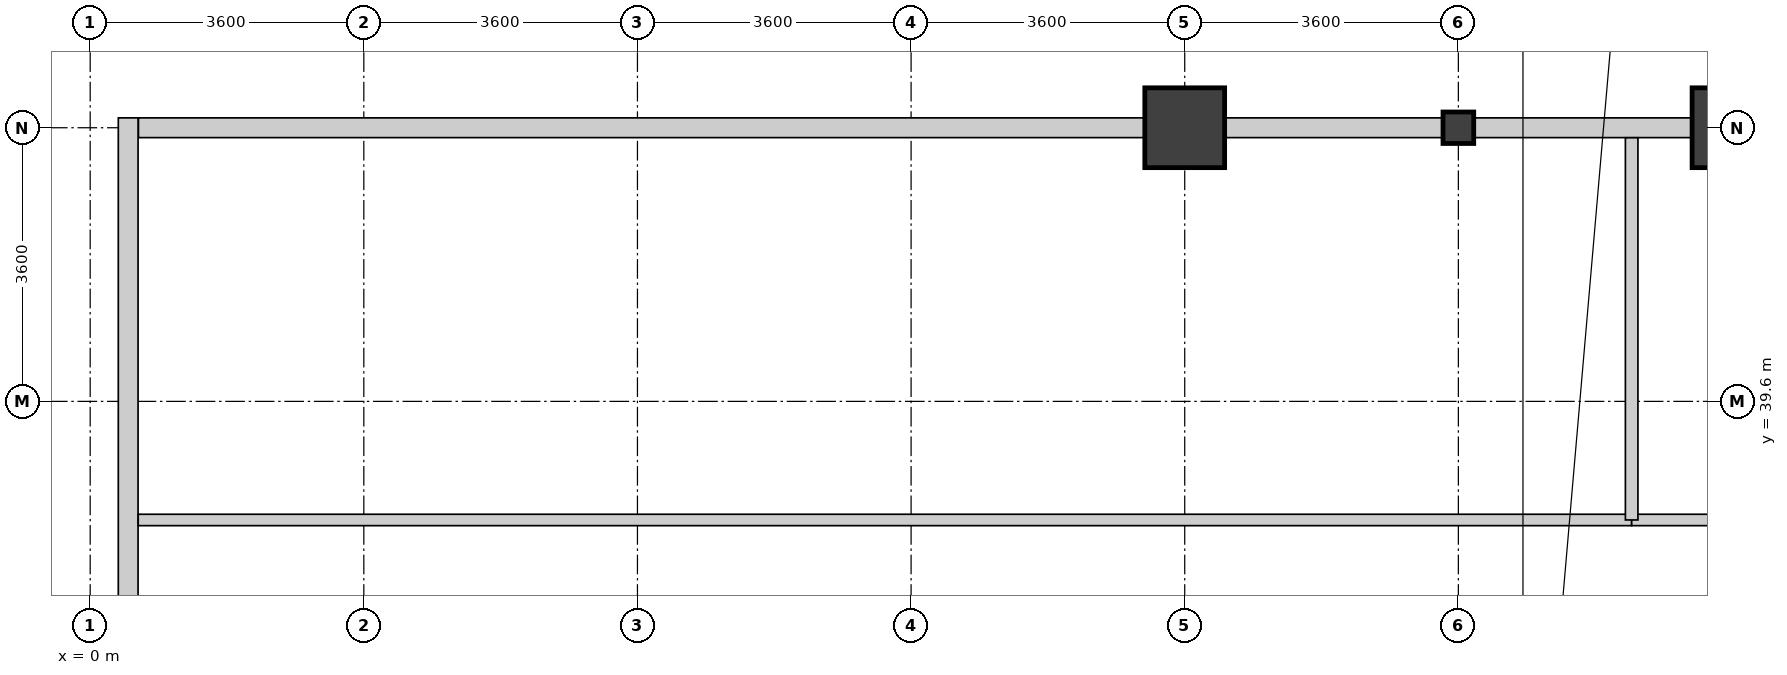
"""IFC4 building model, lengths in metres.
Left out: names, types, materials, properties, quantities, classifications, styles, units other than length and angle.
Written with IfcOpenShell. Run it as: python <this file> out.ifc"""

import sys

from ifc_helpers import new_model, si_unit, direction, frame, frame_2d, origin, origin_2d, place, context, subcontext, project, spatial, rectangle, i_section, extrude, source, transform, mapped, element, fill, save


model = new_model("IFC4")
c1 = context("Model", 3, precision=1e-05, world=origin(), true_north=direction((0.0, 1.0)))
c2 = subcontext(c1, "Body", "Model", "MODEL_VIEW")
j1 = project(units=[si_unit("LENGTHUNIT", "METRE"), si_unit("PLANEANGLEUNIT", "RADIAN")], contexts=[c1])
p1 = place(None, origin())
s1 = spatial("IfcSite", under=j1, at=p1, CompositionType="ELEMENT")
p2 = place(p1, origin())
s2 = spatial("IfcBuilding", under=s1, at=p2, CompositionType="ELEMENT")
p3 = place(p2, frame((0.0, 0.0, 135.6)))
s3 = spatial("IfcBuildingStorey", under=s2, at=p3, CompositionType="ELEMENT", Elevation=135.6)
m1 = source(origin(), c2, "Body", "SweptSolid", [
    extrude(rectangle(XDim=1.05, YDim=1.05, at=origin_2d()), origin(), (0.0, 0.0, 1.0), 4.6),
])
for number, where, z_axis, x_axis in (
    (1, (14.4, 43.2, 0.0), (0.0, 0.0, 1.0), (1.0, 0.0, 0.0)),
    (2, (21.6, 43.2, 0.0), (0.0, 0.0, 1.0), (1.0, 0.0, 0.0)),
):
    element("IfcColumn", number, at=place(p3, frame(where, z_axis=z_axis, x_axis=x_axis)), inside=s3, PredefinedType="COLUMN", context=c2, shape_type="MappedRepresentation", body=[
        mapped(m1, transform((0.0, 0.0, 0.0), x_axis=(1.0, 0.0, 0.0), y_axis=(0.0, 1.0, 0.0), z_axis=(0.0, 0.0, 1.0), scale=1.0)),
    ])
m2 = source(origin(), c2, "Body", "SweptSolid", [
    extrude(i_section(OverallWidth=0.404, OverallDepth=0.414, WebThickness=0.021, FlangeThickness=0.028, FilletRadius=0.015, at=origin_2d()), origin(), (0.0, 0.0, 1.0), 4.6),
])
p4 = place(p3, frame((18.0, 43.2, 0.0), z_axis=(0.0, 0.0, 1.0), x_axis=(1.0, 0.0, 0.0)))
e3 = element("IfcColumn", 3, at=p4, inside=s3, PredefinedType="COLUMN", context=c2, shape_type="MappedRepresentation", body=[
    mapped(m2, transform((0.0, 0.0, 0.0), x_axis=(1.0, 0.0, 0.0), y_axis=(0.0, 1.0, 0.0), z_axis=(0.0, 0.0, 1.0), scale=1.0)),
])
p5 = place(p3, frame((18.203, 43.2, 0.0), z_axis=(0.0, 0.0, 1.0), x_axis=(1.0, 0.0, 0.0)))
e4 = element("IfcWall", 4, at=p5, inside=s3, PredefinedType="STANDARD", context=c2, shape_type="SweptSolid", body=[
    extrude(rectangle(XDim=2.871, YDim=0.26, at=frame_2d((1.436, 0.0))), origin(), (0.0, 0.0, 1.0), 3.89),
])
p6 = place(p5, frame((0.249, 0.0, 0.85)))
e5 = element("IfcOpeningElement", 5, at=p6, cuts=e4, PredefinedType="OPENING", context=c2, shape_type="SweptSolid", body=[
    extrude(rectangle(XDim=0.95, YDim=1.75, at=frame_2d((0.475, 0.875))), frame((0.0, 0.14, 0.0), z_axis=(0.0, -1.0, 0.0), x_axis=(1.0, 0.0, 0.0)), (0.0, 0.0, 1.0), 0.28),
])
p7 = place(p3, frame((14.926, 43.2, 0.0), z_axis=(0.0, 0.0, 1.0), x_axis=(1.0, 0.0, 0.0)))
e6 = element("IfcWall", 6, at=p7, inside=s3, PredefinedType="STANDARD", context=c2, shape_type="SweptSolid", body=[
    extrude(rectangle(XDim=2.871, YDim=0.26, at=frame_2d((1.436, 0.0))), origin(), (0.0, 0.0, 1.0), 3.89),
])
p8 = place(p7, frame((0.96, 0.0, 0.85)))
e7 = element("IfcOpeningElement", 7, at=p8, cuts=e6, PredefinedType="OPENING", context=c2, shape_type="SweptSolid", body=[
    extrude(rectangle(XDim=0.95, YDim=1.75, at=frame_2d((0.475, 0.875))), frame((0.0, 0.14, 0.0), z_axis=(0.0, -1.0, 0.0), x_axis=(1.0, 0.0, 0.0)), (0.0, 0.0, 1.0), 0.28),
])
p9 = place(p3, frame((0.635, 43.2, 0.0), z_axis=(0.0, 0.0, 1.0), x_axis=(1.0, 0.0, 0.0)))
e8 = element("IfcWall", 8, at=p9, inside=s3, PredefinedType="STANDARD", context=c2, shape_type="SweptSolid", body=[
    extrude(rectangle(XDim=13.239, YDim=0.26, at=frame_2d((6.62, 0.0))), origin(), (0.0, 0.0, 1.0), 4.34),
])
p10 = place(p9, frame((0.305, 0.0, 0.85)))
e9 = element("IfcOpeningElement", 9, at=p10, cuts=e8, PredefinedType="OPENING", context=c2, shape_type="SweptSolid", body=[
    extrude(rectangle(XDim=2.7, YDim=2.05, at=frame_2d((1.35, 1.025))), frame((0.0, 0.14, 0.0), z_axis=(0.0, -1.0, 0.0), x_axis=(1.0, 0.0, 0.0)), (0.0, 0.0, 1.0), 0.28),
])
p11 = place(p9, frame((3.615, 0.0, 0.85)))
e10 = element("IfcOpeningElement", 10, at=p11, cuts=e8, PredefinedType="OPENING", context=c2, shape_type="SweptSolid", body=[
    extrude(rectangle(XDim=2.7, YDim=2.05, at=frame_2d((1.35, 1.025))), frame((0.0, 0.14, 0.0), z_axis=(0.0, -1.0, 0.0), x_axis=(1.0, 0.0, 0.0)), (0.0, 0.0, 1.0), 0.28),
])
p12 = place(p9, frame((6.924, 0.0, 0.85)))
e11 = element("IfcOpeningElement", 11, at=p12, cuts=e8, PredefinedType="OPENING", context=c2, shape_type="SweptSolid", body=[
    extrude(rectangle(XDim=2.7, YDim=2.05, at=frame_2d((1.35, 1.025))), frame((0.0, 0.14, 0.0), z_axis=(0.0, -1.0, 0.0), x_axis=(1.0, 0.0, 0.0)), (0.0, 0.0, 1.0), 0.28),
])
p13 = place(p9, frame((10.234, 0.0, 0.85)))
e12 = element("IfcOpeningElement", 12, at=p13, cuts=e8, PredefinedType="OPENING", context=c2, shape_type="SweptSolid", body=[
    extrude(rectangle(XDim=2.7, YDim=2.05, at=frame_2d((1.35, 1.025))), frame((0.0, 0.14, 0.0), z_axis=(0.0, -1.0, 0.0), x_axis=(1.0, 0.0, 0.0)), (0.0, 0.0, 1.0), 0.28),
])
p14 = place(p3, frame((0.5, 36.358, 0.0), z_axis=(0.0, 0.0, 1.0), x_axis=(0.0, 1.0, 0.0)))
e13 = element("IfcWall", 13, at=p14, inside=s3, PredefinedType="STANDARD", context=c2, shape_type="SweptSolid", body=[
    extrude(rectangle(XDim=6.972, YDim=0.26, at=frame_2d((3.486, 0.0))), origin(), (0.0, 0.0, 1.0), 4.34),
])
p15 = place(p14, frame((3.879, 0.0, 0.85)))
e14 = element("IfcOpeningElement", 14, at=p15, cuts=e13, PredefinedType="OPENING", context=c2, shape_type="SweptSolid", body=[
    extrude(rectangle(XDim=2.7, YDim=2.05, at=frame_2d((1.35, 1.025))), frame((0.0, 0.14, 0.0), z_axis=(0.0, -1.0, 0.0), x_axis=(1.0, 0.0, 0.0)), (0.0, 0.0, 1.0), 0.28),
])
p16 = place(p14, frame((2.453, 0.0, 0.85)))
e15 = element("IfcOpeningElement", 15, at=p16, cuts=e13, PredefinedType="OPENING", context=c2, shape_type="SweptSolid", body=[
    extrude(rectangle(XDim=0.95, YDim=1.75, at=frame_2d((0.475, 0.875))), frame((0.0, 0.14, 0.0), z_axis=(0.0, -1.0, 0.0), x_axis=(1.0, 0.0, 0.0)), (0.0, 0.0, 1.0), 0.28),
])
p17 = place(p3, frame((0.632, 38.04, 0.0), z_axis=(0.0, 0.0, 1.0), x_axis=(1.0, 0.0, 0.0)))
e16 = element("IfcWall", 16, at=p17, inside=s3, PredefinedType="PARTITIONING", context=c2, shape_type="SweptSolid", body=[
    extrude(rectangle(XDim=19.648, YDim=0.15, at=frame_2d((9.824, 0.0))), origin(), (0.0, 0.0, 1.0), 4.34),
])
p18 = place(p17, frame((9.174, 0.0, 0.0)))
e17 = element("IfcOpeningElement", 17, at=p18, cuts=e16, PredefinedType="OPENING", context=c2, shape_type="SweptSolid", body=[
    extrude(rectangle(XDim=1.3, YDim=2.12, at=frame_2d((0.65, 1.06))), frame((0.0, 0.085, 0.0), z_axis=(0.0, -1.0, 0.0), x_axis=(1.0, 0.0, 0.0)), (0.0, 0.0, 1.0), 0.17),
])
p19 = place(p3, frame((20.28, 38.04, 0.0), z_axis=(0.0, 0.0, 1.0), x_axis=(1.0, 0.0, 0.0)))
e18 = element("IfcWall", 18, at=p19, inside=s3, PredefinedType="PARTITIONING", context=c2, shape_type="SweptSolid", body=[
    extrude(rectangle(XDim=18.02, YDim=0.15, at=frame_2d((9.01, 0.0))), origin(), (0.0, 0.0, 1.0), 4.34),
])
p20 = place(p19, frame((8.56, 0.0, 0.0)))
e19 = element("IfcOpeningElement", 19, at=p20, cuts=e18, PredefinedType="OPENING", context=c2, shape_type="SweptSolid", body=[
    extrude(rectangle(XDim=0.9, YDim=2.08, at=frame_2d((0.45, 1.04))), frame((0.0, 0.085, 0.0), z_axis=(0.0, -1.0, 0.0), x_axis=(1.0, 0.0, 0.0)), (0.0, 0.0, 1.0), 0.17),
])
p21 = place(p3, frame((20.28, 38.04, 0.0), z_axis=(0.0, 0.0, 1.0), x_axis=(0.0, 1.0, 0.0)))
e20 = element("IfcWall", 20, at=p21, inside=s3, PredefinedType="PARTITIONING", context=c2, shape_type="SweptSolid", body=[
    extrude(rectangle(XDim=5.028, YDim=0.165, at=frame_2d((2.514, 0.0))), origin(), (0.0, 0.0, 1.0), 4.34),
])
p22 = place(p6, origin())
e21 = element("IfcWindow", 21, at=p22, inside=s3, PartitioningType="SINGLE_PANEL", PredefinedType="WINDOW", context=c2, shape_type="SweptSolid", body=[
    extrude(rectangle(XDim=0.95, YDim=1.75, at=frame_2d((0.475, 0.875))), frame((0.0, 0.03, 0.0), z_axis=(0.0, -1.0, 0.0), x_axis=(1.0, 0.0, 0.0)), (0.0, 0.0, 1.0), 0.06),
])
fill(e5, e21)
p23 = place(p8, origin())
e22 = element("IfcWindow", 22, at=p23, inside=s3, PartitioningType="SINGLE_PANEL", PredefinedType="WINDOW", context=c2, shape_type="SweptSolid", body=[
    extrude(rectangle(XDim=0.95, YDim=1.75, at=frame_2d((0.475, 0.875))), frame((0.0, 0.03, 0.0), z_axis=(0.0, -1.0, 0.0), x_axis=(1.0, 0.0, 0.0)), (0.0, 0.0, 1.0), 0.06),
])
fill(e7, e22)
p24 = place(p10, origin())
e23 = element("IfcWindow", 23, at=p24, inside=s3, PartitioningType="SINGLE_PANEL", PredefinedType="WINDOW", context=c2, shape_type="SweptSolid", body=[
    extrude(rectangle(XDim=2.7, YDim=2.05, at=frame_2d((1.35, 1.025))), frame((0.0, 0.03, 0.0), z_axis=(0.0, -1.0, 0.0), x_axis=(1.0, 0.0, 0.0)), (0.0, 0.0, 1.0), 0.06),
])
fill(e9, e23)
p25 = place(p11, origin())
e24 = element("IfcWindow", 24, at=p25, inside=s3, PartitioningType="SINGLE_PANEL", PredefinedType="WINDOW", context=c2, shape_type="SweptSolid", body=[
    extrude(rectangle(XDim=2.7, YDim=2.05, at=frame_2d((1.35, 1.025))), frame((0.0, 0.03, 0.0), z_axis=(0.0, -1.0, 0.0), x_axis=(1.0, 0.0, 0.0)), (0.0, 0.0, 1.0), 0.06),
])
fill(e10, e24)
p26 = place(p12, origin())
e25 = element("IfcWindow", 25, at=p26, inside=s3, PartitioningType="SINGLE_PANEL", PredefinedType="WINDOW", context=c2, shape_type="SweptSolid", body=[
    extrude(rectangle(XDim=2.7, YDim=2.05, at=frame_2d((1.35, 1.025))), frame((0.0, 0.03, 0.0), z_axis=(0.0, -1.0, 0.0), x_axis=(1.0, 0.0, 0.0)), (0.0, 0.0, 1.0), 0.06),
])
fill(e11, e25)
p27 = place(p13, origin())
e26 = element("IfcWindow", 26, at=p27, inside=s3, PartitioningType="SINGLE_PANEL", PredefinedType="WINDOW", context=c2, shape_type="SweptSolid", body=[
    extrude(rectangle(XDim=2.7, YDim=2.05, at=frame_2d((1.35, 1.025))), frame((0.0, 0.03, 0.0), z_axis=(0.0, -1.0, 0.0), x_axis=(1.0, 0.0, 0.0)), (0.0, 0.0, 1.0), 0.06),
])
fill(e12, e26)
p28 = place(p15, origin())
e27 = element("IfcWindow", 27, at=p28, inside=s3, PartitioningType="SINGLE_PANEL", PredefinedType="WINDOW", context=c2, shape_type="SweptSolid", body=[
    extrude(rectangle(XDim=2.7, YDim=2.05, at=frame_2d((1.35, 1.025))), frame((0.0, 0.03, 0.0), z_axis=(0.0, -1.0, 0.0), x_axis=(1.0, 0.0, 0.0)), (0.0, 0.0, 1.0), 0.06),
])
fill(e14, e27)
p29 = place(p16, origin())
e28 = element("IfcWindow", 28, at=p29, inside=s3, PartitioningType="SINGLE_PANEL", PredefinedType="WINDOW", context=c2, shape_type="SweptSolid", body=[
    extrude(rectangle(XDim=0.95, YDim=1.75, at=frame_2d((0.475, 0.875))), frame((0.0, 0.03, 0.0), z_axis=(0.0, -1.0, 0.0), x_axis=(1.0, 0.0, 0.0)), (0.0, 0.0, 1.0), 0.06),
])
fill(e15, e28)
p30 = place(p18, origin())
e29 = element("IfcDoor", 29, at=p30, inside=s3, OperationType="DOUBLE_DOOR_SINGLE_SWING", PredefinedType="DOOR", context=c2, shape_type="SweptSolid", body=[
    extrude(rectangle(XDim=1.3, YDim=2.12, at=frame_2d((0.65, 1.06))), frame((0.0, 0.025, 0.0), z_axis=(0.0, -1.0, 0.0), x_axis=(1.0, 0.0, 0.0)), (0.0, 0.0, 1.0), 0.05),
])
fill(e17, e29)
save(model, sys.argv[1])
